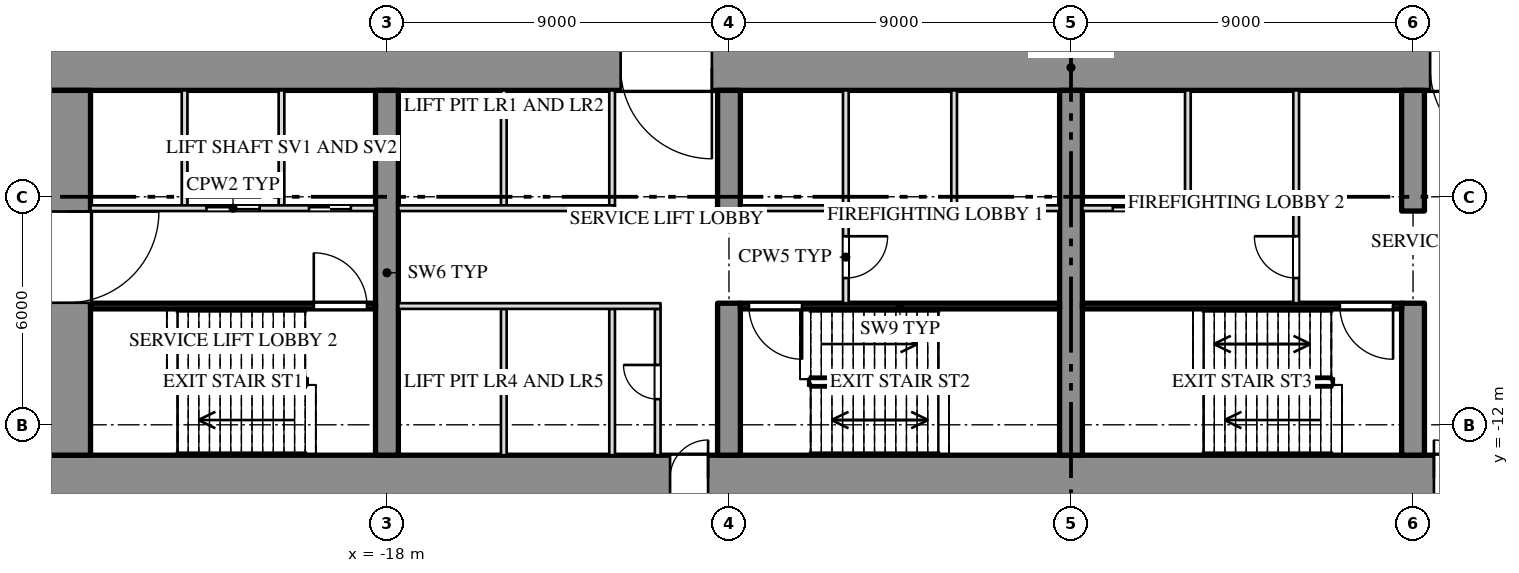
"""IFC4 building model, lengths in metres.
Left out: names, types, materials, properties, quantities, classifications, styles, units other than length and angle.
Written with IfcOpenShell. Run it as: python <this file> out.ifc"""

import sys

from ifc_helpers import new_model, si_unit, direction, frame, frame_2d, origin, place, context, subcontext, project, spatial, rectangle, extrude, element, fill, save


model = new_model("IFC4")
c1 = context("Model", 3, precision=1e-05, world=origin(), true_north=direction((0.0, 1.0)))
c2 = subcontext(c1, "Body", "Model", "MODEL_VIEW")
j1 = project(units=[si_unit("LENGTHUNIT", "METRE"), si_unit("PLANEANGLEUNIT", "RADIAN")], contexts=[c1])
p1 = place(None, origin())
s1 = spatial("IfcSite", under=j1, at=p1, CompositionType="ELEMENT")
p2 = place(p1, origin())
s2 = spatial("IfcBuilding", under=s1, at=p2, CompositionType="ELEMENT")
p3 = place(p2, frame((0.0, 0.0, -4.2)))
s3 = spatial("IfcBuildingStorey", under=s2, at=p3, CompositionType="ELEMENT", Elevation=-4.2)
p4 = place(p3, frame((-27.0, -2.6, 0.0), z_axis=(0.0, 0.0, 1.0), x_axis=(1.0, 0.0, 0.0)))
e1 = element("IfcWall", 1, at=p4, inside=s3, PredefinedType="SHEAR", context=c2, shape_type="SweptSolid", body=[
    extrude(rectangle(XDim=54.0, YDim=1.2, at=frame_2d((27.0, 0.0))), origin(), (0.0, 0.0, 1.0), 3.9),
])
p5 = place(p4, frame((15.15, 0.0, 0.0)))
e2 = element("IfcOpeningElement", 2, at=p5, cuts=e1, PredefinedType="OPENING", context=c2, shape_type="SweptSolid", body=[
    extrude(rectangle(XDim=2.4, YDim=2.1, at=frame_2d((1.2, 1.05))), frame((0.0, 0.612, 0.0), z_axis=(0.0, -1.0, 0.0), x_axis=(1.0, 0.0, 0.0)), (0.0, 0.0, 1.0), 1.224),
])
p6 = place(p4, frame((36.45, 0.0, 0.0)))
e3 = element("IfcOpeningElement", 3, at=p6, cuts=e1, PredefinedType="OPENING", context=c2, shape_type="SweptSolid", body=[
    extrude(rectangle(XDim=2.4, YDim=2.1, at=frame_2d((1.2, 1.05))), frame((0.0, 0.612, 0.0), z_axis=(0.0, -1.0, 0.0), x_axis=(1.0, 0.0, 0.0)), (0.0, 0.0, 1.0), 1.224),
])
p7 = place(p3, frame((-27.0, -13.4, 0.0), z_axis=(0.0, 0.0, 1.0), x_axis=(1.0, 0.0, 0.0)))
e4 = element("IfcWall", 4, at=p7, inside=s3, PredefinedType="SHEAR", context=c2, shape_type="SweptSolid", body=[
    extrude(rectangle(XDim=54.0, YDim=1.2, at=frame_2d((27.0, 0.0))), origin(), (0.0, 0.0, 1.0), 3.9),
])
p8 = place(p7, frame((16.45, 0.0, 0.0)))
e5 = element("IfcOpeningElement", 5, at=p8, cuts=e4, PredefinedType="OPENING", context=c2, shape_type="SweptSolid", body=[
    extrude(rectangle(XDim=1.0, YDim=2.1, at=frame_2d((0.5, 1.05))), frame((0.0, 0.612, 0.0), z_axis=(0.0, -1.0, 0.0), x_axis=(1.0, 0.0, 0.0)), (0.0, 0.0, 1.0), 1.224),
])
p9 = place(p7, frame((36.55, 0.0, 0.0)))
e6 = element("IfcOpeningElement", 6, at=p9, cuts=e4, PredefinedType="OPENING", context=c2, shape_type="SweptSolid", body=[
    extrude(rectangle(XDim=1.0, YDim=2.1, at=frame_2d((0.5, 1.05))), frame((0.0, 0.612, 0.0), z_axis=(0.0, -1.0, 0.0), x_axis=(1.0, 0.0, 0.0)), (0.0, 0.0, 1.0), 1.224),
])
p10 = place(p3, frame((-26.4, -12.8, 0.0), z_axis=(0.0, 0.0, 1.0), x_axis=(0.0, 1.0, 0.0)))
e7 = element("IfcWall", 7, at=p10, inside=s3, PredefinedType="SHEAR", context=c2, shape_type="SweptSolid", body=[
    extrude(rectangle(XDim=9.6, YDim=1.2, at=frame_2d((4.8, 0.0))), origin(), (0.0, 0.0, 1.0), 3.9),
])
p11 = place(p10, frame((4.012, 0.0, 0.0)))
e8 = element("IfcOpeningElement", 8, at=p11, cuts=e7, PredefinedType="OPENING", context=c2, shape_type="SweptSolid", body=[
    extrude(rectangle(XDim=2.4, YDim=2.1, at=frame_2d((1.2, 1.05))), frame((0.0, 0.612, 0.0), z_axis=(0.0, -1.0, 0.0), x_axis=(1.0, 0.0, 0.0)), (0.0, 0.0, 1.0), 1.224),
])
p12 = place(p3, frame((-18.0, -12.8, 0.0), z_axis=(0.0, 0.0, 1.0), x_axis=(0.0, 1.0, 0.0)))
e9 = element("IfcWall", 9, at=p12, inside=s3, PredefinedType="SHEAR", context=c2, shape_type="SweptSolid", body=[
    extrude(rectangle(XDim=9.6, YDim=0.6, at=frame_2d((4.8, 0.0))), origin(), (0.0, 0.0, 1.0), 3.9),
])
p13 = place(p3, frame((-9.0, -12.8, 0.0), z_axis=(0.0, 0.0, 1.0), x_axis=(0.0, 1.0, 0.0)))
e10 = element("IfcWall", 10, at=p13, inside=s3, PredefinedType="SHEAR", context=c2, shape_type="SweptSolid", body=[
    extrude(rectangle(XDim=4.0, YDim=0.6, at=frame_2d((2.0, 0.0))), origin(), (0.0, 0.0, 1.0), 3.9),
])
p14 = place(p3, frame((-9.0, -6.375, 0.0), z_axis=(0.0, 0.0, 1.0), x_axis=(0.0, 1.0, 0.0)))
e11 = element("IfcWall", 11, at=p14, inside=s3, PredefinedType="SHEAR", context=c2, shape_type="SweptSolid", body=[
    extrude(rectangle(XDim=3.175, YDim=0.6, at=frame_2d((1.587, 0.0))), origin(), (0.0, 0.0, 1.0), 3.9),
])
p15 = place(p3, frame((0.0, -12.8, 0.0), z_axis=(0.0, 0.0, 1.0), x_axis=(0.0, 1.0, 0.0)))
e12 = element("IfcWall", 12, at=p15, inside=s3, PredefinedType="SHEAR", context=c2, shape_type="SweptSolid", body=[
    extrude(rectangle(XDim=9.6, YDim=0.6, at=frame_2d((4.8, 0.0))), origin(), (0.0, 0.0, 1.0), 3.9),
])
p16 = place(p3, frame((9.0, -12.8, 0.0), z_axis=(0.0, 0.0, 1.0), x_axis=(0.0, 1.0, 0.0)))
e13 = element("IfcWall", 13, at=p16, inside=s3, PredefinedType="SHEAR", context=c2, shape_type="SweptSolid", body=[
    extrude(rectangle(XDim=4.0, YDim=0.6, at=frame_2d((2.0, 0.0))), origin(), (0.0, 0.0, 1.0), 3.9),
])
p17 = place(p3, frame((9.0, -6.375, 0.0), z_axis=(0.0, 0.0, 1.0), x_axis=(0.0, 1.0, 0.0)))
e14 = element("IfcWall", 14, at=p17, inside=s3, PredefinedType="SHEAR", context=c2, shape_type="SweptSolid", body=[
    extrude(rectangle(XDim=3.175, YDim=0.6, at=frame_2d((1.587, 0.0))), origin(), (0.0, 0.0, 1.0), 3.9),
])
for number, where, z_axis, x_axis in (
    (15, (-20.775, -6.225, 0.0), (0.0, 0.0, 1.0), (0.0, 1.0, 0.0)),
    (16, (-23.325, -6.225, 0.0), (0.0, 0.0, 1.0), (0.0, 1.0, 0.0)),
    (17, (-12.075, -6.225, 0.0), (0.0, 0.0, 1.0), (0.0, 1.0, 0.0)),
    (18, (-14.925, -6.225, 0.0), (0.0, 0.0, 1.0), (0.0, 1.0, 0.0)),
    (19, (-3.075, -6.225, 0.0), (0.0, 0.0, 1.0), (0.0, 1.0, 0.0)),
    (20, (-5.925, -6.225, 0.0), (0.0, 0.0, 1.0), (0.0, 1.0, 0.0)),
    (21, (3.075, -6.225, 0.0), (0.0, 0.0, 1.0), (0.0, 1.0, 0.0)),
    (22, (5.925, -6.225, 0.0), (0.0, 0.0, 1.0), (0.0, 1.0, 0.0)),
):
    element("IfcWall", number, at=place(p3, frame(where, z_axis=z_axis, x_axis=x_axis)), inside=s3, PredefinedType="PARTITIONING", context=c2, shape_type="SweptSolid", body=[
        extrude(rectangle(XDim=3.025, YDim=0.15, at=frame_2d((1.513, 0.0))), origin(), (0.0, 0.0, 1.0), 3.9),
    ])
p18 = place(p3, frame((-10.875, -12.8, 0.0), z_axis=(0.0, 0.0, 1.0), x_axis=(0.0, 1.0, 0.0)))
e23 = element("IfcWall", 23, at=p18, inside=s3, PredefinedType="PARTITIONING", context=c2, shape_type="SweptSolid", body=[
    extrude(rectangle(XDim=3.85, YDim=0.15, at=frame_2d((1.925, 0.0))), origin(), (0.0, 0.0, 1.0), 3.9),
])
p19 = place(p18, frame((1.475, 0.0, 0.0)))
e24 = element("IfcOpeningElement", 24, at=p19, cuts=e23, PredefinedType="OPENING", context=c2, shape_type="SweptSolid", body=[
    extrude(rectangle(XDim=0.9, YDim=2.1, at=frame_2d((0.45, 1.05))), frame((0.0, 0.087, 0.0), z_axis=(0.0, -1.0, 0.0), x_axis=(1.0, 0.0, 0.0)), (0.0, 0.0, 1.0), 0.174),
])
for number, where, z_axis, x_axis in (
    (25, (-12.075, -12.8, 0.0), (0.0, 0.0, 1.0), (0.0, 1.0, 0.0)),
    (26, (-14.925, -12.8, 0.0), (0.0, 0.0, 1.0), (0.0, 1.0, 0.0)),
):
    element("IfcWall", number, at=place(p3, frame(where, z_axis=z_axis, x_axis=x_axis)), inside=s3, PredefinedType="PARTITIONING", context=c2, shape_type="SweptSolid", body=[
        extrude(rectangle(XDim=3.85, YDim=0.15, at=frame_2d((1.925, 0.0))), origin(), (0.0, 0.0, 1.0), 3.9),
    ])
p20 = place(p3, frame((-5.925, -8.8, 0.0), z_axis=(0.0, 0.0, 1.0), x_axis=(0.0, 1.0, 0.0)))
e27 = element("IfcWall", 27, at=p20, inside=s3, PredefinedType="PARTITIONING", context=c2, shape_type="SweptSolid", body=[
    extrude(rectangle(XDim=2.425, YDim=0.15, at=frame_2d((1.212, 0.0))), origin(), (0.0, 0.0, 1.0), 3.9),
])
p21 = place(p20, frame((0.662, 0.0, 0.0)))
e28 = element("IfcOpeningElement", 28, at=p21, cuts=e27, PredefinedType="OPENING", context=c2, shape_type="SweptSolid", body=[
    extrude(rectangle(XDim=1.1, YDim=2.1, at=frame_2d((0.55, 1.05))), frame((0.0, 0.087, 0.0), z_axis=(0.0, -1.0, 0.0), x_axis=(1.0, 0.0, 0.0)), (0.0, 0.0, 1.0), 0.174),
])
p22 = place(p3, frame((5.925, -8.8, 0.0), z_axis=(0.0, 0.0, 1.0), x_axis=(0.0, 1.0, 0.0)))
e29 = element("IfcWall", 29, at=p22, inside=s3, PredefinedType="PARTITIONING", context=c2, shape_type="SweptSolid", body=[
    extrude(rectangle(XDim=2.425, YDim=0.15, at=frame_2d((1.212, 0.0))), origin(), (0.0, 0.0, 1.0), 3.9),
])
p23 = place(p22, frame((0.662, 0.0, 0.0)))
e30 = element("IfcOpeningElement", 30, at=p23, cuts=e29, PredefinedType="OPENING", context=c2, shape_type="SweptSolid", body=[
    extrude(rectangle(XDim=1.1, YDim=2.1, at=frame_2d((0.55, 1.05))), frame((0.0, 0.087, 0.0), z_axis=(0.0, -1.0, 0.0), x_axis=(1.0, 0.0, 0.0)), (0.0, 0.0, 1.0), 0.174),
])
p24 = place(p3, frame((-25.8, -6.3, 0.0), z_axis=(0.0, 0.0, 1.0), x_axis=(1.0, 0.0, 0.0)))
e31 = element("IfcWall", 31, at=p24, inside=s3, PredefinedType="PARTITIONING", context=c2, shape_type="SweptSolid", body=[
    extrude(rectangle(XDim=7.5, YDim=0.15, at=frame_2d((3.75, 0.0))), origin(), (0.0, 0.0, 1.0), 3.9),
])
p25 = place(p24, frame((3.05, 0.0, 0.0)))
e32 = element("IfcOpeningElement", 32, at=p25, cuts=e31, PredefinedType="OPENING", context=c2, shape_type="SweptSolid", body=[
    extrude(rectangle(XDim=1.4, YDim=2.1, at=frame_2d((0.7, 1.05))), frame((0.0, 0.087, 0.0), z_axis=(0.0, -1.0, 0.0), x_axis=(1.0, 0.0, 0.0)), (0.0, 0.0, 1.0), 0.174),
])
p26 = place(p24, frame((5.75, 0.0, 0.0)))
e33 = element("IfcOpeningElement", 33, at=p26, cuts=e31, PredefinedType="OPENING", context=c2, shape_type="SweptSolid", body=[
    extrude(rectangle(XDim=1.1, YDim=2.1, at=frame_2d((0.55, 1.05))), frame((0.0, 0.087, 0.0), z_axis=(0.0, -1.0, 0.0), x_axis=(1.0, 0.0, 0.0)), (0.0, 0.0, 1.0), 0.174),
])
p27 = place(p3, frame((-17.7, -6.3, 0.0), z_axis=(0.0, 0.0, 1.0), x_axis=(1.0, 0.0, 0.0)))
e34 = element("IfcWall", 34, at=p27, inside=s3, PredefinedType="PARTITIONING", context=c2, shape_type="SweptSolid", body=[
    extrude(rectangle(XDim=5.7, YDim=0.15, at=frame_2d((2.85, 0.0))), origin(), (0.0, 0.0, 1.0), 3.9),
])
p28 = place(p3, frame((-8.7, -6.3, 0.0), z_axis=(0.0, 0.0, 1.0), x_axis=(1.0, 0.0, 0.0)))
e35 = element("IfcWall", 35, at=p28, inside=s3, PredefinedType="PARTITIONING", context=c2, shape_type="SweptSolid", body=[
    extrude(rectangle(XDim=2.85, YDim=0.15, at=frame_2d((1.425, 0.0))), origin(), (0.0, 0.0, 1.0), 3.9),
])
p29 = place(p3, frame((-3.15, -6.3, 0.0), z_axis=(0.0, 0.0, 1.0), x_axis=(1.0, 0.0, 0.0)))
e36 = element("IfcWall", 36, at=p29, inside=s3, PredefinedType="PARTITIONING", context=c2, shape_type="SweptSolid", body=[
    extrude(rectangle(XDim=2.85, YDim=0.15, at=frame_2d((1.425, 0.0))), origin(), (0.0, 0.0, 1.0), 3.9),
])
p30 = place(p29, frame((0.95, 0.0, 0.0)))
e37 = element("IfcOpeningElement", 37, at=p30, cuts=e36, PredefinedType="OPENING", context=c2, shape_type="SweptSolid", body=[
    extrude(rectangle(XDim=1.1, YDim=2.1, at=frame_2d((0.55, 1.05))), frame((0.0, 0.087, 0.0), z_axis=(0.0, -1.0, 0.0), x_axis=(1.0, 0.0, 0.0)), (0.0, 0.0, 1.0), 0.174),
])
p31 = place(p3, frame((0.3, -6.3, 0.0), z_axis=(0.0, 0.0, 1.0), x_axis=(1.0, 0.0, 0.0)))
e38 = element("IfcWall", 38, at=p31, inside=s3, PredefinedType="PARTITIONING", context=c2, shape_type="SweptSolid", body=[
    extrude(rectangle(XDim=2.85, YDim=0.15, at=frame_2d((1.425, 0.0))), origin(), (0.0, 0.0, 1.0), 3.9),
])
p32 = place(p31, frame((0.8, 0.0, 0.0)))
e39 = element("IfcOpeningElement", 39, at=p32, cuts=e38, PredefinedType="OPENING", context=c2, shape_type="SweptSolid", body=[
    extrude(rectangle(XDim=1.1, YDim=2.1, at=frame_2d((0.55, 1.05))), frame((0.0, 0.087, 0.0), z_axis=(0.0, -1.0, 0.0), x_axis=(1.0, 0.0, 0.0)), (0.0, 0.0, 1.0), 0.174),
])
p33 = place(p3, frame((-25.8, -8.875, 0.0), z_axis=(0.0, 0.0, 1.0), x_axis=(1.0, 0.0, 0.0)))
e40 = element("IfcWall", 40, at=p33, inside=s3, PredefinedType="SHEAR", context=c2, shape_type="SweptSolid", body=[
    extrude(rectangle(XDim=7.5, YDim=0.15, at=frame_2d((3.75, 0.0))), origin(), (0.0, 0.0, 1.0), 3.9),
])
p34 = place(p33, frame((5.875, 0.0, 0.0)))
e41 = element("IfcOpeningElement", 41, at=p34, cuts=e40, PredefinedType="OPENING", context=c2, shape_type="SweptSolid", body=[
    extrude(rectangle(XDim=1.4, YDim=2.1, at=frame_2d((0.7, 1.05))), frame((0.0, 0.087, 0.0), z_axis=(0.0, -1.0, 0.0), x_axis=(1.0, 0.0, 0.0)), (0.0, 0.0, 1.0), 0.174),
])
p35 = place(p3, frame((-17.7, -8.875, 0.0), z_axis=(0.0, 0.0, 1.0), x_axis=(1.0, 0.0, 0.0)))
e42 = element("IfcWall", 42, at=p35, inside=s3, PredefinedType="PARTITIONING", context=c2, shape_type="SweptSolid", body=[
    extrude(rectangle(XDim=6.9, YDim=0.15, at=frame_2d((3.45, 0.0))), origin(), (0.0, 0.0, 1.0), 3.9),
])
p36 = place(p3, frame((-8.7, -8.875, 0.0), z_axis=(0.0, 0.0, 1.0), x_axis=(1.0, 0.0, 0.0)))
e43 = element("IfcWall", 43, at=p36, inside=s3, PredefinedType="SHEAR", context=c2, shape_type="SweptSolid", body=[
    extrude(rectangle(XDim=8.4, YDim=0.15, at=frame_2d((4.2, 0.0))), origin(), (0.0, 0.0, 1.0), 3.9),
])
p37 = place(p36, frame((0.225, 0.0, 0.0)))
e44 = element("IfcOpeningElement", 44, at=p37, cuts=e43, PredefinedType="OPENING", context=c2, shape_type="SweptSolid", body=[
    extrude(rectangle(XDim=1.4, YDim=2.1, at=frame_2d((0.7, 1.05))), frame((0.0, 0.087, 0.0), z_axis=(0.0, -1.0, 0.0), x_axis=(1.0, 0.0, 0.0)), (0.0, 0.0, 1.0), 0.174),
])
p38 = place(p3, frame((0.3, -8.875, 0.0), z_axis=(0.0, 0.0, 1.0), x_axis=(1.0, 0.0, 0.0)))
e45 = element("IfcWall", 45, at=p38, inside=s3, PredefinedType="SHEAR", context=c2, shape_type="SweptSolid", body=[
    extrude(rectangle(XDim=8.4, YDim=0.15, at=frame_2d((4.2, 0.0))), origin(), (0.0, 0.0, 1.0), 3.9),
])
p39 = place(p38, frame((6.775, 0.0, 0.0)))
e46 = element("IfcOpeningElement", 46, at=p39, cuts=e45, PredefinedType="OPENING", context=c2, shape_type="SweptSolid", body=[
    extrude(rectangle(XDim=1.4, YDim=2.1, at=frame_2d((0.7, 1.05))), frame((0.0, 0.087, 0.0), z_axis=(0.0, -1.0, 0.0), x_axis=(1.0, 0.0, 0.0)), (0.0, 0.0, 1.0), 0.174),
])
p40 = place(p11, origin())
e47 = element("IfcDoor", 47, at=p40, inside=s3, OperationType="DOUBLE_DOOR_SINGLE_SWING", PredefinedType="DOOR", context=c2, shape_type="SweptSolid", body=[
    extrude(rectangle(XDim=2.4, YDim=2.1, at=frame_2d((1.2, 1.05))), frame((0.0, 0.025, 0.0), z_axis=(0.0, -1.0, 0.0), x_axis=(1.0, 0.0, 0.0)), (0.0, 0.0, 1.0), 0.05),
])
fill(e8, e47)
p41 = place(p25, origin())
e48 = element("IfcDoor", 48, at=p41, inside=s3, OperationType="SLIDING_TO_RIGHT", PredefinedType="DOOR", context=c2, shape_type="SweptSolid", body=[
    extrude(rectangle(XDim=1.4, YDim=2.1, at=frame_2d((0.7, 1.05))), frame((0.0, 0.025, 0.0), z_axis=(0.0, -1.0, 0.0), x_axis=(1.0, 0.0, 0.0)), (0.0, 0.0, 1.0), 0.05),
])
fill(e32, e48)
p42 = place(p26, origin())
e49 = element("IfcDoor", 49, at=p42, inside=s3, OperationType="SLIDING_TO_LEFT", PredefinedType="DOOR", context=c2, shape_type="SweptSolid", body=[
    extrude(rectangle(XDim=1.1, YDim=2.1, at=frame_2d((0.55, 1.05))), frame((0.0, 0.025, 0.0), z_axis=(0.0, -1.0, 0.0), x_axis=(1.0, 0.0, 0.0)), (0.0, 0.0, 1.0), 0.05),
])
fill(e33, e49)
p43 = place(p34, origin())
e50 = element("IfcDoor", 50, at=p43, inside=s3, OperationType="DOUBLE_DOOR_SINGLE_SWING", PredefinedType="DOOR", context=c2, shape_type="SweptSolid", body=[
    extrude(rectangle(XDim=1.4, YDim=2.1, at=frame_2d((0.7, 1.05))), frame((0.0, 0.025, 0.0), z_axis=(0.0, -1.0, 0.0), x_axis=(1.0, 0.0, 0.0)), (0.0, 0.0, 1.0), 0.05),
])
fill(e41, e50)
p44 = place(p19, origin())
e51 = element("IfcDoor", 51, at=p44, inside=s3, OperationType="SINGLE_SWING_RIGHT", PredefinedType="DOOR", context=c2, shape_type="SweptSolid", body=[
    extrude(rectangle(XDim=0.9, YDim=2.1, at=frame_2d((0.45, 1.05))), frame((0.0, 0.025, 0.0), z_axis=(0.0, -1.0, 0.0), x_axis=(1.0, 0.0, 0.0)), (0.0, 0.0, 1.0), 0.05),
])
fill(e24, e51)
p45 = place(p5, origin())
e52 = element("IfcDoor", 52, at=p45, inside=s3, OperationType="DOUBLE_DOOR_SINGLE_SWING", PredefinedType="DOOR", context=c2, shape_type="SweptSolid", body=[
    extrude(rectangle(XDim=2.4, YDim=2.1, at=frame_2d((1.2, 1.05))), frame((0.0, 0.025, 0.0), z_axis=(0.0, -1.0, 0.0), x_axis=(1.0, 0.0, 0.0)), (0.0, 0.0, 1.0), 0.05),
])
fill(e2, e52)
p46 = place(p8, origin())
e53 = element("IfcDoor", 53, at=p46, inside=s3, OperationType="SINGLE_SWING_RIGHT", PredefinedType="DOOR", context=c2, shape_type="SweptSolid", body=[
    extrude(rectangle(XDim=1.0, YDim=2.1, at=frame_2d((0.5, 1.05))), frame((0.0, 0.025, 0.0), z_axis=(0.0, -1.0, 0.0), x_axis=(1.0, 0.0, 0.0)), (0.0, 0.0, 1.0), 0.05),
])
fill(e5, e53)
p47 = place(p37, origin())
e54 = element("IfcDoor", 54, at=p47, inside=s3, OperationType="DOUBLE_DOOR_SINGLE_SWING", PredefinedType="DOOR", context=c2, shape_type="SweptSolid", body=[
    extrude(rectangle(XDim=1.4, YDim=2.1, at=frame_2d((0.7, 1.05))), frame((0.0, 0.025, 0.0), z_axis=(0.0, -1.0, 0.0), x_axis=(1.0, 0.0, 0.0)), (0.0, 0.0, 1.0), 0.05),
])
fill(e44, e54)
p48 = place(p21, origin())
e55 = element("IfcDoor", 55, at=p48, inside=s3, OperationType="SINGLE_SWING_LEFT", PredefinedType="DOOR", context=c2, shape_type="SweptSolid", body=[
    extrude(rectangle(XDim=1.1, YDim=2.1, at=frame_2d((0.55, 1.05))), frame((0.0, 0.025, 0.0), z_axis=(0.0, -1.0, 0.0), x_axis=(1.0, 0.0, 0.0)), (0.0, 0.0, 1.0), 0.05),
])
fill(e28, e55)
p49 = place(p30, origin())
e56 = element("IfcDoor", 56, at=p49, inside=s3, OperationType="SLIDING_TO_RIGHT", PredefinedType="DOOR", context=c2, shape_type="SweptSolid", body=[
    extrude(rectangle(XDim=1.1, YDim=2.1, at=frame_2d((0.55, 1.05))), frame((0.0, 0.025, 0.0), z_axis=(0.0, -1.0, 0.0), x_axis=(1.0, 0.0, 0.0)), (0.0, 0.0, 1.0), 0.05),
])
fill(e37, e56)
p50 = place(p32, origin())
e57 = element("IfcDoor", 57, at=p50, inside=s3, OperationType="SLIDING_TO_LEFT", PredefinedType="DOOR", context=c2, shape_type="SweptSolid", body=[
    extrude(rectangle(XDim=1.1, YDim=2.1, at=frame_2d((0.55, 1.05))), frame((0.0, 0.025, 0.0), z_axis=(0.0, -1.0, 0.0), x_axis=(1.0, 0.0, 0.0)), (0.0, 0.0, 1.0), 0.05),
])
fill(e39, e57)
p51 = place(p23, origin())
e58 = element("IfcDoor", 58, at=p51, inside=s3, OperationType="SINGLE_SWING_RIGHT", PredefinedType="DOOR", context=c2, shape_type="SweptSolid", body=[
    extrude(rectangle(XDim=1.1, YDim=2.1, at=frame_2d((0.55, 1.05))), frame((0.0, 0.025, 0.0), z_axis=(0.0, -1.0, 0.0), x_axis=(1.0, 0.0, 0.0)), (0.0, 0.0, 1.0), 0.05),
])
fill(e30, e58)
p52 = place(p39, origin())
e59 = element("IfcDoor", 59, at=p52, inside=s3, OperationType="DOUBLE_DOOR_SINGLE_SWING", PredefinedType="DOOR", context=c2, shape_type="SweptSolid", body=[
    extrude(rectangle(XDim=1.4, YDim=2.1, at=frame_2d((0.7, 1.05))), frame((0.0, 0.025, 0.0), z_axis=(0.0, -1.0, 0.0), x_axis=(1.0, 0.0, 0.0)), (0.0, 0.0, 1.0), 0.05),
])
fill(e46, e59)
p53 = place(p9, origin())
e60 = element("IfcDoor", 60, at=p53, inside=s3, OperationType="SINGLE_SWING_LEFT", PredefinedType="DOOR", context=c2, shape_type="SweptSolid", body=[
    extrude(rectangle(XDim=1.0, YDim=2.1, at=frame_2d((0.5, 1.05))), frame((0.0, 0.025, 0.0), z_axis=(0.0, -1.0, 0.0), x_axis=(1.0, 0.0, 0.0)), (0.0, 0.0, 1.0), 0.05),
])
fill(e6, e60)
p54 = place(p6, origin())
e61 = element("IfcDoor", 61, at=p54, inside=s3, OperationType="DOUBLE_DOOR_SINGLE_SWING", PredefinedType="DOOR", context=c2, shape_type="SweptSolid", body=[
    extrude(rectangle(XDim=2.4, YDim=2.1, at=frame_2d((1.2, 1.05))), frame((0.0, 0.025, 0.0), z_axis=(0.0, -1.0, 0.0), x_axis=(1.0, 0.0, 0.0)), (0.0, 0.0, 1.0), 0.05),
])
fill(e3, e61)
save(model, sys.argv[1])
